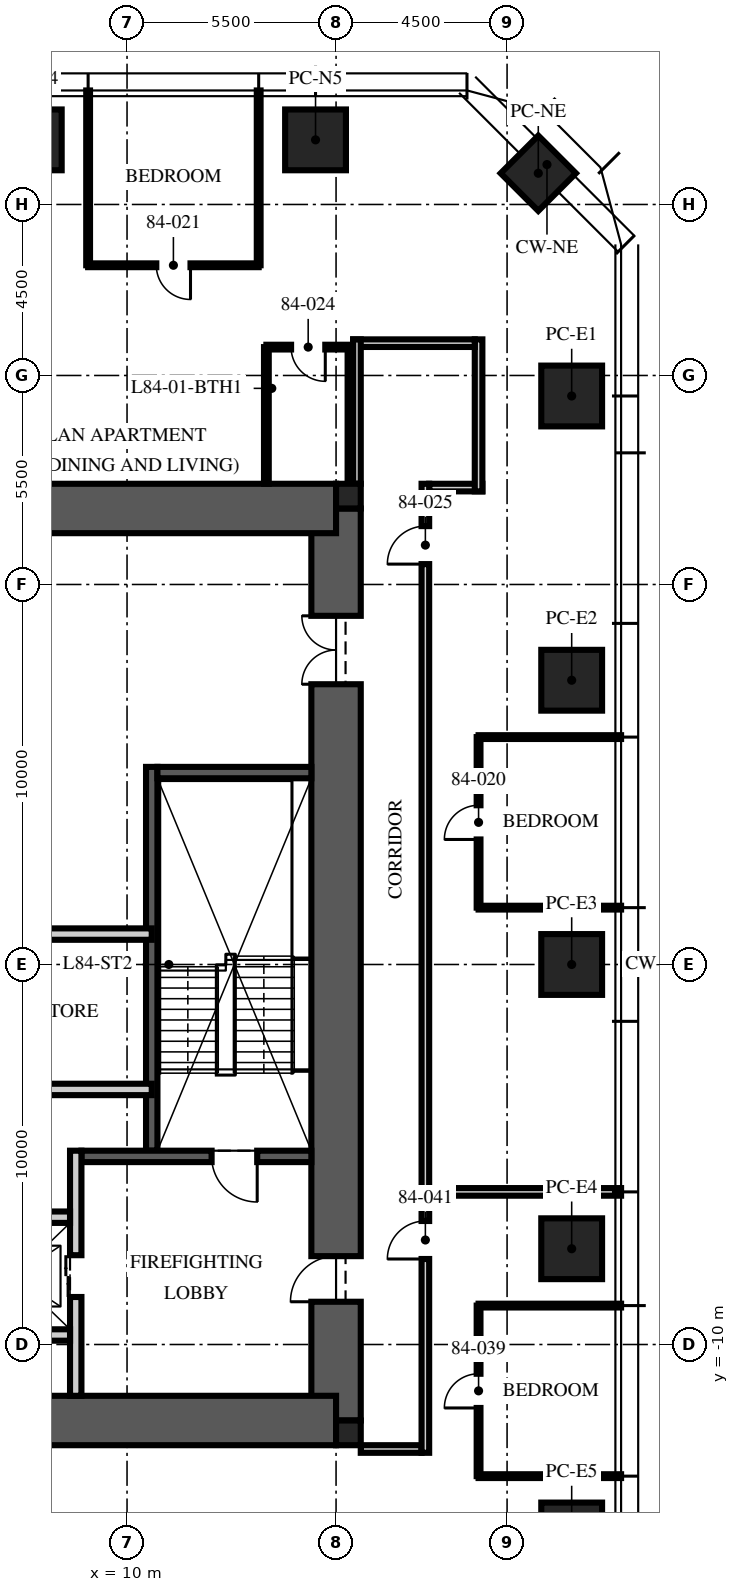
"""IFC4 building model, lengths in metres.
Left out: names, types, materials, properties, quantities, classifications, styles, units other than length and angle.
Written with IfcOpenShell. Run it as: python <this file> out.ifc"""

import sys

from ifc_helpers import new_model, si_unit, direction, frame, frame_2d, origin, origin_2d, place, context, subcontext, project, spatial, rectangle, extrude, element, fill, save


model = new_model("IFC4")
c1 = context("Model", 3, precision=1e-05, world=origin(), true_north=direction((0.0, 1.0)))
c2 = subcontext(c1, "Body", "Model", "MODEL_VIEW")
j1 = project(units=[si_unit("LENGTHUNIT", "METRE"), si_unit("PLANEANGLEUNIT", "RADIAN")], contexts=[c1])
p1 = place(None, origin())
s1 = spatial("IfcSite", under=j1, at=p1, CompositionType="ELEMENT")
p2 = place(p1, origin())
s2 = spatial("IfcBuilding", under=s1, at=p2, CompositionType="ELEMENT")
p3 = place(p2, frame((0.0, 0.0, 334.5)))
s3 = spatial("IfcBuildingStorey", under=s2, at=p3, CompositionType="ELEMENT", Elevation=334.5)
p4 = place(p3, frame((15.5, -12.0, -0.25), z_axis=(0.0, 0.0, 1.0), x_axis=(0.0, 1.0, 0.0)))
e1 = element("IfcWall", 1, at=p4, inside=s3, PredefinedType="SHEAR", context=c2, shape_type="SweptSolid", body=[
    extrude(rectangle(XDim=24.0, YDim=1.3, at=frame_2d((12.0, 0.0))), origin(), (0.0, 0.0, 1.0), 3.75),
])
p5 = place(p4, frame((3.125, 0.0, 0.25)))
e2 = element("IfcOpeningElement", 2, at=p5, cuts=e1, PredefinedType="OPENING", context=c2, shape_type="SweptSolid", body=[
    extrude(rectangle(XDim=1.2, YDim=2.1, at=frame_2d((0.6, 1.05))), frame((0.0, 0.66, 0.0), z_axis=(0.0, -1.0, 0.0), x_axis=(1.0, 0.0, 0.0)), (0.0, 0.0, 1.0), 1.32),
])
p6 = place(p4, frame((19.375, 0.0, 0.25)))
e3 = element("IfcOpeningElement", 3, at=p6, cuts=e1, PredefinedType="OPENING", context=c2, shape_type="SweptSolid", body=[
    extrude(rectangle(XDim=1.8, YDim=2.1, at=frame_2d((0.9, 1.05))), frame((0.0, 0.66, 0.0), z_axis=(0.0, -1.0, 0.0), x_axis=(1.0, 0.0, 0.0)), (0.0, 0.0, 1.0), 1.32),
])
for number, where, z_axis, x_axis in (
    (4, (-15.5, 12.0, -0.25), (0.0, 0.0, 1.0), (1.0, 0.0, 0.0)),
    (5, (-15.5, -12.0, -0.25), (0.0, 0.0, 1.0), (1.0, 0.0, 0.0)),
):
    element("IfcWall", number, at=place(p3, frame(where, z_axis=z_axis, x_axis=x_axis)), inside=s3, PredefinedType="SHEAR", context=c2, shape_type="SweptSolid", body=[
        extrude(rectangle(XDim=31.0, YDim=1.3, at=frame_2d((15.5, 0.0))), origin(), (0.0, 0.0, 1.0), 3.75),
    ])
for number, where, z_axis, x_axis in (
    (6, (15.825, 12.325, -0.25), (0.0, 0.0, 1.0), (1.0, 0.0, 0.0)),
    (7, (15.825, -12.325, -0.25), (0.0, 0.0, 1.0), (1.0, 0.0, 0.0)),
):
    element("IfcColumn", number, at=place(p3, frame(where, z_axis=z_axis, x_axis=x_axis)), inside=s3, PredefinedType="COLUMN", context=c2, shape_type="SweptSolid", body=[
        extrude(rectangle(XDim=0.65, YDim=0.65, at=origin_2d()), origin(), (0.0, 0.0, 1.0), 3.75),
    ])
for number, where, z_axis, x_axis in (
    (8, (7.48, 21.7, 0.0), (0.0, 0.0, 1.0), (1.0, 0.0, 0.0)),
    (9, (14.96, 21.7, 0.0), (0.0, 0.0, 1.0), (1.0, 0.0, 0.0)),
    (10, (21.7, 14.96, 0.0), (0.0, 0.0, 1.0), (0.0, 1.0, 0.0)),
    (11, (21.7, 7.48, 0.0), (0.0, 0.0, 1.0), (0.0, 1.0, 0.0)),
    (12, (21.7, 0.0, 0.0), (0.0, 0.0, 1.0), (0.0, 1.0, 0.0)),
    (13, (21.7, -7.48, 0.0), (0.0, 0.0, 1.0), (0.0, 1.0, 0.0)),
    (14, (21.7, -14.96, 0.0), (0.0, 0.0, 1.0), (0.0, 1.0, 0.0)),
):
    element("IfcColumn", number, at=place(p3, frame(where, z_axis=z_axis, x_axis=x_axis)), inside=s3, PredefinedType="COLUMN", context=c2, shape_type="SweptSolid", body=[
        extrude(rectangle(XDim=1.6, YDim=1.6, at=origin_2d()), origin(), (0.0, 0.0, 1.0), 3.75),
    ])
p7 = place(p3, frame((20.821, 20.821, 0.0), z_axis=(0.0, 0.0, 1.0), x_axis=(0.707106781187, -0.707106781187, 0.0)))
e15 = element("IfcColumn", 15, at=p7, inside=s3, PredefinedType="COLUMN", context=c2, shape_type="SweptSolid", body=[
    extrude(rectangle(XDim=1.4, YDim=1.4, at=origin_2d()), origin(), (0.0, 0.0, 1.0), 3.75),
])
p8 = place(p3, frame((10.65, -4.9, 0.0), z_axis=(0.0, 0.0, 1.0), x_axis=(0.0, 1.0, 0.0)))
e16 = element("IfcWall", 16, at=p8, inside=s3, PredefinedType="SOLIDWALL", context=c2, shape_type="SweptSolid", body=[
    extrude(rectangle(XDim=10.1, YDim=0.3, at=frame_2d((5.05, 0.0))), origin(), (0.0, 0.0, 1.0), 3.5),
])
p9 = place(p3, frame((14.85, -5.05, 0.0), z_axis=(0.0, 0.0, 1.0), x_axis=(-1.0, 0.0, 0.0)))
e17 = element("IfcWall", 17, at=p9, inside=s3, PredefinedType="SOLIDWALL", context=c2, shape_type="SweptSolid", body=[
    extrude(rectangle(XDim=6.05, YDim=0.3, at=frame_2d((3.025, 0.0))), origin(), (0.0, 0.0, 1.0), 3.5),
])
p10 = place(p9, frame((1.425, 0.0, 0.0)))
e18 = element("IfcOpeningElement", 18, at=p10, cuts=e17, PredefinedType="OPENING", context=c2, shape_type="SweptSolid", body=[
    extrude(rectangle(XDim=1.2, YDim=2.1, at=frame_2d((0.6, 1.05))), frame((0.0, 0.16, 0.0), z_axis=(0.0, -1.0, 0.0), x_axis=(1.0, 0.0, 0.0)), (0.0, 0.0, 1.0), 0.32),
])
p11 = place(p3, frame((14.85, 5.05, 0.0), z_axis=(0.0, 0.0, 1.0), x_axis=(-1.0, 0.0, 0.0)))
e19 = element("IfcWall", 19, at=p11, inside=s3, PredefinedType="SOLIDWALL", context=c2, shape_type="SweptSolid", body=[
    extrude(rectangle(XDim=4.05, YDim=0.3, at=frame_2d((2.025, 0.0))), origin(), (0.0, 0.0, 1.0), 3.5),
])
p12 = place(p3, frame((8.65, -11.35, 0.0), z_axis=(0.0, 0.0, 1.0), x_axis=(0.0, 1.0, 0.0)))
e20 = element("IfcWall", 20, at=p12, inside=s3, PredefinedType="PARTITIONING", context=c2, shape_type="SweptSolid", body=[
    extrude(rectangle(XDim=6.45, YDim=0.3, at=frame_2d((3.225, 0.0))), origin(), (0.0, 0.0, 1.0), 3.5),
])
p13 = place(p12, frame((2.6, 0.0, 0.0)))
e21 = element("IfcOpeningElement", 21, at=p13, cuts=e20, PredefinedType="OPENING", context=c2, shape_type="SweptSolid", body=[
    extrude(rectangle(XDim=1.1, YDim=2.1, at=frame_2d((0.55, 1.05))), frame((0.0, 0.16, 0.0), z_axis=(0.0, -1.0, 0.0), x_axis=(1.0, 0.0, 0.0)), (0.0, 0.0, 1.0), 0.32),
])
p14 = place(p3, frame((-8.5, -6.65, 0.0), z_axis=(0.0, 0.0, 1.0), x_axis=(1.0, 0.0, 0.0)))
e22 = element("IfcWall", 22, at=p14, inside=s3, PredefinedType="PARTITIONING", context=c2, shape_type="SweptSolid", body=[
    extrude(rectangle(XDim=17.0, YDim=0.3, at=frame_2d((8.5, 0.0))), origin(), (0.0, 0.0, 1.0), 3.5),
])
p15 = place(p14, frame((7.8, 0.0, 0.0)))
e23 = element("IfcOpeningElement", 23, at=p15, cuts=e22, PredefinedType="OPENING", context=c2, shape_type="SweptSolid", body=[
    extrude(rectangle(XDim=1.3, YDim=2.4, at=frame_2d((0.65, 1.2))), frame((0.0, 0.16, 0.0), z_axis=(0.0, -1.0, 0.0), x_axis=(1.0, 0.0, 0.0)), (0.0, 0.0, 1.0), 0.32),
])
p16 = place(p14, frame((5.65, 0.0, 0.0)))
e24 = element("IfcOpeningElement", 24, at=p16, cuts=e22, PredefinedType="OPENING", context=c2, shape_type="SweptSolid", body=[
    extrude(rectangle(XDim=0.9, YDim=2.1, at=frame_2d((0.45, 1.05))), frame((0.0, 0.16, 0.0), z_axis=(0.0, -1.0, 0.0), x_axis=(1.0, 0.0, 0.0)), (0.0, 0.0, 1.0), 0.32),
])
p17 = place(p14, frame((10.4, 0.0, 0.0)))
e25 = element("IfcOpeningElement", 25, at=p17, cuts=e22, PredefinedType="OPENING", context=c2, shape_type="SweptSolid", body=[
    extrude(rectangle(XDim=0.9, YDim=2.1, at=frame_2d((0.45, 1.05))), frame((0.0, 0.16, 0.0), z_axis=(0.0, -1.0, 0.0), x_axis=(1.0, 0.0, 0.0)), (0.0, 0.0, 1.0), 0.32),
])
p18 = place(p3, frame((5.6, -9.75, 0.0), z_axis=(0.0, 0.0, 1.0), x_axis=(1.0, 0.0, 0.0)))
e26 = element("IfcWall", 26, at=p18, inside=s3, PredefinedType="PARTITIONING", context=c2, shape_type="SweptSolid", body=[
    extrude(rectangle(XDim=2.9, YDim=0.3, at=frame_2d((1.45, 0.0))), origin(), (0.0, 0.0, 1.0), 3.5),
])
p19 = place(p3, frame((-10.65, 0.8, 0.0), z_axis=(0.0, 0.0, 1.0), x_axis=(1.0, 0.0, 0.0)))
e27 = element("IfcWall", 27, at=p19, inside=s3, PredefinedType="PARTITIONING", context=c2, shape_type="SweptSolid", body=[
    extrude(rectangle(XDim=21.3, YDim=0.3, at=frame_2d((10.65, 0.0))), origin(), (0.0, 0.0, 1.0), 3.5),
])
p20 = place(p19, frame((10.05, 0.0, 0.0)))
e28 = element("IfcOpeningElement", 28, at=p20, cuts=e27, PredefinedType="OPENING", context=c2, shape_type="SweptSolid", body=[
    extrude(rectangle(XDim=1.2, YDim=2.1, at=frame_2d((0.6, 1.05))), frame((0.0, 0.16, 0.0), z_axis=(0.0, -1.0, 0.0), x_axis=(1.0, 0.0, 0.0)), (0.0, 0.0, 1.0), 0.32),
])
p21 = place(p19, frame((1.74, 0.0, 0.0)))
e29 = element("IfcOpeningElement", 29, at=p21, cuts=e27, PredefinedType="OPENING", context=c2, shape_type="SweptSolid", body=[
    extrude(rectangle(XDim=0.9, YDim=2.1, at=frame_2d((0.45, 1.05))), frame((0.0, 0.16, 0.0), z_axis=(0.0, -1.0, 0.0), x_axis=(1.0, 0.0, 0.0)), (0.0, 0.0, 1.0), 0.32),
])
p22 = place(p3, frame((10.65, -3.288, 0.0), z_axis=(0.0, 0.0, 1.0), x_axis=(-1.0, 0.0, 0.0)))
e30 = element("IfcWall", 30, at=p22, inside=s3, PredefinedType="PARTITIONING", context=c2, shape_type="SweptSolid", body=[
    extrude(rectangle(XDim=7.35, YDim=0.3, at=frame_2d((3.675, 0.0))), origin(), (0.0, 0.0, 1.0), 3.5),
])
p23 = place(p3, frame((17.95, 12.55, 0.0), z_axis=(0.0, 0.0, 1.0), x_axis=(1.0, 0.0, 0.0)))
e31 = element("IfcWall", 31, at=p23, inside=s3, PredefinedType="PARTITIONING", context=c2, shape_type="SweptSolid", body=[
    extrude(rectangle(XDim=1.4, YDim=0.2, at=frame_2d((0.7, 0.0))), origin(), (0.0, 0.0, 1.0), 3.5),
])
p24 = place(p3, frame((19.25, 12.45, 0.0), z_axis=(0.0, 0.0, 1.0), x_axis=(0.0, 1.0, 0.0)))
e32 = element("IfcWall", 32, at=p24, inside=s3, PredefinedType="PARTITIONING", context=c2, shape_type="SweptSolid", body=[
    extrude(rectangle(XDim=4.0, YDim=0.2, at=frame_2d((2.0, 0.0))), origin(), (0.0, 0.0, 1.0), 2.9),
])
p25 = place(p3, frame((19.15, 16.35, 0.0), z_axis=(0.0, 0.0, 1.0), x_axis=(-1.0, 0.0, 0.0)))
e33 = element("IfcWall", 33, at=p25, inside=s3, PredefinedType="PARTITIONING", context=c2, shape_type="SweptSolid", body=[
    extrude(rectangle(XDim=3.2, YDim=0.2, at=frame_2d((1.6, 0.0))), origin(), (0.0, 0.0, 1.0), 2.6),
])
p26 = place(p3, frame((16.05, 16.45, 0.0), z_axis=(0.0, 0.0, 1.0), x_axis=(0.0, -1.0, 0.0)))
e34 = element("IfcWall", 34, at=p26, inside=s3, PredefinedType="PARTITIONING", context=c2, shape_type="SweptSolid", body=[
    extrude(rectangle(XDim=3.8, YDim=0.2, at=frame_2d((1.9, 0.0))), origin(), (0.0, 0.0, 1.0), 2.6),
])
p27 = place(p3, frame((16.15, -12.75, 0.0), z_axis=(0.0, 0.0, 1.0), x_axis=(1.0, 0.0, 0.0)))
e35 = element("IfcWall", 35, at=p27, inside=s3, PredefinedType="PARTITIONING", context=c2, shape_type="SweptSolid", body=[
    extrude(rectangle(XDim=1.6, YDim=0.2, at=frame_2d((0.8, 0.0))), origin(), (0.0, 0.0, 1.0), 2.6),
])
p28 = place(p3, frame((17.95, -5.984, 0.0), z_axis=(0.0, 0.0, 1.0), x_axis=(1.0, 0.0, 0.0)))
e36 = element("IfcWall", 36, at=p28, inside=s3, PredefinedType="PARTITIONING", context=c2, shape_type="SweptSolid", body=[
    extrude(rectangle(XDim=5.05, YDim=0.2, at=frame_2d((2.525, 0.0))), origin(), (0.0, 0.0, 1.0), 3.01),
])
for number, where, z_axis, x_axis in (
    (37, (19.25, 1.496, 0.0), (0.0, 0.0, 1.0), (1.0, 0.0, 0.0)),
    (38, (19.25, 5.984, 0.0), (0.0, 0.0, 1.0), (1.0, 0.0, 0.0)),
):
    element("IfcWall", number, at=place(p3, frame(where, z_axis=z_axis, x_axis=x_axis)), inside=s3, PredefinedType="PARTITIONING", context=c2, shape_type="SweptSolid", body=[
        extrude(rectangle(XDim=3.75, YDim=0.1, at=frame_2d((1.875, 0.0))), origin(), (0.0, 0.0, 1.0), 3.01),
    ])
for number, where, z_axis, x_axis in (
    (39, (13.464, 18.4, 0.0), (0.0, 0.0, 1.0), (0.0, 1.0, 0.0)),
    (40, (8.976, 18.4, 0.0), (0.0, 0.0, 1.0), (0.0, 1.0, 0.0)),
):
    element("IfcWall", number, at=place(p3, frame(where, z_axis=z_axis, x_axis=x_axis)), inside=s3, PredefinedType="PARTITIONING", context=c2, shape_type="SweptSolid", body=[
        extrude(rectangle(XDim=4.6, YDim=0.1, at=frame_2d((2.3, 0.0))), origin(), (0.0, 0.0, 1.0), 3.01),
    ])
for number, where, z_axis, x_axis in (
    (41, (19.25, -13.464, 0.0), (0.0, 0.0, 1.0), (1.0, 0.0, 0.0)),
    (42, (19.25, -8.976, 0.0), (0.0, 0.0, 1.0), (1.0, 0.0, 0.0)),
):
    element("IfcWall", number, at=place(p3, frame(where, z_axis=z_axis, x_axis=x_axis)), inside=s3, PredefinedType="PARTITIONING", context=c2, shape_type="SweptSolid", body=[
        extrude(rectangle(XDim=3.75, YDim=0.1, at=frame_2d((1.875, 0.0))), origin(), (0.0, 0.0, 1.0), 3.01),
    ])
p29 = place(p3, frame((19.25, 1.496, 0.0), z_axis=(0.0, 0.0, 1.0), x_axis=(0.0, 1.0, 0.0)))
e43 = element("IfcWall", 43, at=p29, inside=s3, PredefinedType="PARTITIONING", context=c2, shape_type="SweptSolid", body=[
    extrude(rectangle(XDim=4.488, YDim=0.1, at=frame_2d((2.244, 0.0))), origin(), (0.0, 0.0, 1.0), 2.91),
])
p30 = place(p29, frame((1.794, 0.0, 0.0)))
e44 = element("IfcOpeningElement", 44, at=p30, cuts=e43, PredefinedType="OPENING", context=c2, shape_type="SweptSolid", body=[
    extrude(rectangle(XDim=0.9, YDim=2.1, at=frame_2d((0.45, 1.05))), frame((0.0, 0.06, 0.0), z_axis=(0.0, -1.0, 0.0), x_axis=(1.0, 0.0, 0.0)), (0.0, 0.0, 1.0), 0.12),
])
p31 = place(p3, frame((13.464, 18.4, 0.0), z_axis=(0.0, 0.0, 1.0), x_axis=(-1.0, 0.0, 0.0)))
e45 = element("IfcWall", 45, at=p31, inside=s3, PredefinedType="PARTITIONING", context=c2, shape_type="SweptSolid", body=[
    extrude(rectangle(XDim=4.488, YDim=0.1, at=frame_2d((2.244, 0.0))), origin(), (0.0, 0.0, 1.0), 2.91),
])
p32 = place(p31, frame((1.794, 0.0, 0.0)))
e46 = element("IfcOpeningElement", 46, at=p32, cuts=e45, PredefinedType="OPENING", context=c2, shape_type="SweptSolid", body=[
    extrude(rectangle(XDim=0.9, YDim=2.1, at=frame_2d((0.45, 1.05))), frame((0.0, 0.06, 0.0), z_axis=(0.0, -1.0, 0.0), x_axis=(1.0, 0.0, 0.0)), (0.0, 0.0, 1.0), 0.12),
])
p33 = place(p3, frame((15.866, 16.246, 0.0), z_axis=(0.0, 0.0, 1.0), x_axis=(-1.0, 0.0, 0.0)))
e47 = element("IfcWall", 47, at=p33, inside=s3, PredefinedType="PARTITIONING", context=c2, shape_type="SweptSolid", body=[
    extrude(rectangle(XDim=2.2, YDim=0.125, at=frame_2d((1.1, 0.0))), origin(), (0.0, 0.0, 1.0), 2.9),
])
p34 = place(p33, frame((0.65, 0.0, 0.0)))
e48 = element("IfcOpeningElement", 48, at=p34, cuts=e47, PredefinedType="OPENING", context=c2, shape_type="SweptSolid", body=[
    extrude(rectangle(XDim=0.9, YDim=2.1, at=frame_2d((0.45, 1.05))), frame((0.0, 0.073, 0.0), z_axis=(0.0, -1.0, 0.0), x_axis=(1.0, 0.0, 0.0)), (0.0, 0.0, 1.0), 0.145),
])
p35 = place(p3, frame((15.866, 12.65, 0.0), z_axis=(0.0, 0.0, 1.0), x_axis=(0.0, 1.0, 0.0)))
e49 = element("IfcWall", 49, at=p35, inside=s3, PredefinedType="PARTITIONING", context=c2, shape_type="SweptSolid", body=[
    extrude(rectangle(XDim=3.596, YDim=0.125, at=frame_2d((1.798, 0.0))), origin(), (0.0, 0.0, 1.0), 2.6),
])
p36 = place(p3, frame((13.667, 12.65, 0.0), z_axis=(0.0, 0.0, 1.0), x_axis=(0.0, 1.0, 0.0)))
e50 = element("IfcWall", 50, at=p36, inside=s3, PredefinedType="PARTITIONING", context=c2, shape_type="SweptSolid", body=[
    extrude(rectangle(XDim=3.596, YDim=0.125, at=frame_2d((1.798, 0.0))), origin(), (0.0, 0.0, 1.0), 3.5),
])
p37 = place(p3, frame((19.25, -13.464, 0.0), z_axis=(0.0, 0.0, 1.0), x_axis=(0.0, 1.0, 0.0)))
e51 = element("IfcWall", 51, at=p37, inside=s3, PredefinedType="PARTITIONING", context=c2, shape_type="SweptSolid", body=[
    extrude(rectangle(XDim=4.488, YDim=0.1, at=frame_2d((2.244, 0.0))), origin(), (0.0, 0.0, 1.0), 2.91),
])
p38 = place(p37, frame((1.794, 0.0, 0.0)))
e52 = element("IfcOpeningElement", 52, at=p38, cuts=e51, PredefinedType="OPENING", context=c2, shape_type="SweptSolid", body=[
    extrude(rectangle(XDim=0.9, YDim=2.1, at=frame_2d((0.45, 1.05))), frame((0.0, 0.06, 0.0), z_axis=(0.0, -1.0, 0.0), x_axis=(1.0, 0.0, 0.0)), (0.0, 0.0, 1.0), 0.12),
])
p39 = place(p3, frame((17.85, -12.85, 0.0), z_axis=(0.0, 0.0, 1.0), x_axis=(0.0, 1.0, 0.0)))
e53 = element("IfcWall", 53, at=p39, inside=s3, PredefinedType="PARTITIONING", context=c2, shape_type="SweptSolid", body=[
    extrude(rectangle(XDim=25.5, YDim=0.2, at=frame_2d((12.75, 0.0))), origin(), (0.0, 0.0, 1.0), 2.9),
])
p40 = place(p39, frame((23.386, 0.0, 0.0)))
e54 = element("IfcOpeningElement", 54, at=p40, cuts=e53, PredefinedType="OPENING", context=c2, shape_type="SweptSolid", body=[
    extrude(rectangle(XDim=1.0, YDim=2.2, at=frame_2d((0.5, 1.1))), frame((0.0, 0.11, 0.0), z_axis=(0.0, -1.0, 0.0), x_axis=(1.0, 0.0, 0.0)), (0.0, 0.0, 1.0), 0.22),
])
p41 = place(p39, frame((5.1, 0.0, 0.0)))
e55 = element("IfcOpeningElement", 55, at=p41, cuts=e53, PredefinedType="OPENING", context=c2, shape_type="SweptSolid", body=[
    extrude(rectangle(XDim=1.0, YDim=2.2, at=frame_2d((0.5, 1.1))), frame((0.0, 0.11, 0.0), z_axis=(0.0, -1.0, 0.0), x_axis=(1.0, 0.0, 0.0)), (0.0, 0.0, 1.0), 0.22),
])
p42 = place(p10, origin())
e56 = element("IfcDoor", 56, at=p42, inside=s3, OperationType="SINGLE_SWING_LEFT", PredefinedType="DOOR", context=c2, shape_type="SweptSolid", body=[
    extrude(rectangle(XDim=1.2, YDim=2.1, at=frame_2d((0.6, 1.05))), frame((0.0, 0.025, 0.0), z_axis=(0.0, -1.0, 0.0), x_axis=(1.0, 0.0, 0.0)), (0.0, 0.0, 1.0), 0.05),
])
fill(e18, e56)
p43 = place(p5, origin())
e57 = element("IfcDoor", 57, at=p43, inside=s3, OperationType="SINGLE_SWING_LEFT", PredefinedType="DOOR", context=c2, shape_type="SweptSolid", body=[
    extrude(rectangle(XDim=1.2, YDim=2.1, at=frame_2d((0.6, 1.05))), frame((0.0, 0.025, 0.0), z_axis=(0.0, -1.0, 0.0), x_axis=(1.0, 0.0, 0.0)), (0.0, 0.0, 1.0), 0.05),
])
fill(e2, e57)
p44 = place(p6, origin())
e58 = element("IfcDoor", 58, at=p44, inside=s3, OperationType="DOUBLE_DOOR_SINGLE_SWING", PredefinedType="DOOR", context=c2, shape_type="SweptSolid", body=[
    extrude(rectangle(XDim=1.8, YDim=2.1, at=frame_2d((0.9, 1.05))), frame((0.0, 0.025, 0.0), z_axis=(0.0, -1.0, 0.0), x_axis=(1.0, 0.0, 0.0)), (0.0, 0.0, 1.0), 0.05),
])
fill(e3, e58)
p45 = place(p13, origin())
e59 = element("IfcDoor", 59, at=p45, inside=s3, OperationType="DOUBLE_DOOR_SLIDING", PredefinedType="DOOR", context=c2, shape_type="SweptSolid", body=[
    extrude(rectangle(XDim=1.1, YDim=2.1, at=frame_2d((0.55, 1.05))), frame((0.0, 0.025, 0.0), z_axis=(0.0, -1.0, 0.0), x_axis=(1.0, 0.0, 0.0)), (0.0, 0.0, 1.0), 0.05),
])
fill(e21, e59)
p46 = place(p30, origin())
e60 = element("IfcDoor", 60, at=p46, inside=s3, OperationType="SINGLE_SWING_LEFT", PredefinedType="DOOR", context=c2, shape_type="SweptSolid", body=[
    extrude(rectangle(XDim=0.9, YDim=2.1, at=frame_2d((0.45, 1.05))), frame((0.0, 0.025, 0.0), z_axis=(0.0, -1.0, 0.0), x_axis=(1.0, 0.0, 0.0)), (0.0, 0.0, 1.0), 0.05),
])
fill(e44, e60)
p47 = place(p32, origin())
e61 = element("IfcDoor", 61, at=p47, inside=s3, OperationType="SINGLE_SWING_LEFT", PredefinedType="DOOR", context=c2, shape_type="SweptSolid", body=[
    extrude(rectangle(XDim=0.9, YDim=2.1, at=frame_2d((0.45, 1.05))), frame((0.0, 0.025, 0.0), z_axis=(0.0, -1.0, 0.0), x_axis=(1.0, 0.0, 0.0)), (0.0, 0.0, 1.0), 0.05),
])
fill(e46, e61)
p48 = place(p34, origin())
e62 = element("IfcDoor", 62, at=p48, inside=s3, OperationType="SINGLE_SWING_LEFT", PredefinedType="DOOR", context=c2, shape_type="SweptSolid", body=[
    extrude(rectangle(XDim=0.9, YDim=2.1, at=frame_2d((0.45, 1.05))), frame((0.0, 0.025, 0.0), z_axis=(0.0, -1.0, 0.0), x_axis=(1.0, 0.0, 0.0)), (0.0, 0.0, 1.0), 0.05),
])
fill(e48, e62)
p49 = place(p40, origin())
e63 = element("IfcDoor", 63, at=p49, inside=s3, OperationType="SINGLE_SWING_LEFT", PredefinedType="DOOR", context=c2, shape_type="SweptSolid", body=[
    extrude(rectangle(XDim=1.0, YDim=2.2, at=frame_2d((0.5, 1.1))), frame((0.0, 0.025, 0.0), z_axis=(0.0, -1.0, 0.0), x_axis=(1.0, 0.0, 0.0)), (0.0, 0.0, 1.0), 0.05),
])
fill(e54, e63)
p50 = place(p38, origin())
e64 = element("IfcDoor", 64, at=p50, inside=s3, OperationType="SINGLE_SWING_LEFT", PredefinedType="DOOR", context=c2, shape_type="SweptSolid", body=[
    extrude(rectangle(XDim=0.9, YDim=2.1, at=frame_2d((0.45, 1.05))), frame((0.0, 0.025, 0.0), z_axis=(0.0, -1.0, 0.0), x_axis=(1.0, 0.0, 0.0)), (0.0, 0.0, 1.0), 0.05),
])
fill(e52, e64)
p51 = place(p41, origin())
e65 = element("IfcDoor", 65, at=p51, inside=s3, OperationType="SINGLE_SWING_LEFT", PredefinedType="DOOR", context=c2, shape_type="SweptSolid", body=[
    extrude(rectangle(XDim=1.0, YDim=2.2, at=frame_2d((0.5, 1.1))), frame((0.0, 0.025, 0.0), z_axis=(0.0, -1.0, 0.0), x_axis=(1.0, 0.0, 0.0)), (0.0, 0.0, 1.0), 0.05),
])
fill(e55, e65)
save(model, sys.argv[1])
